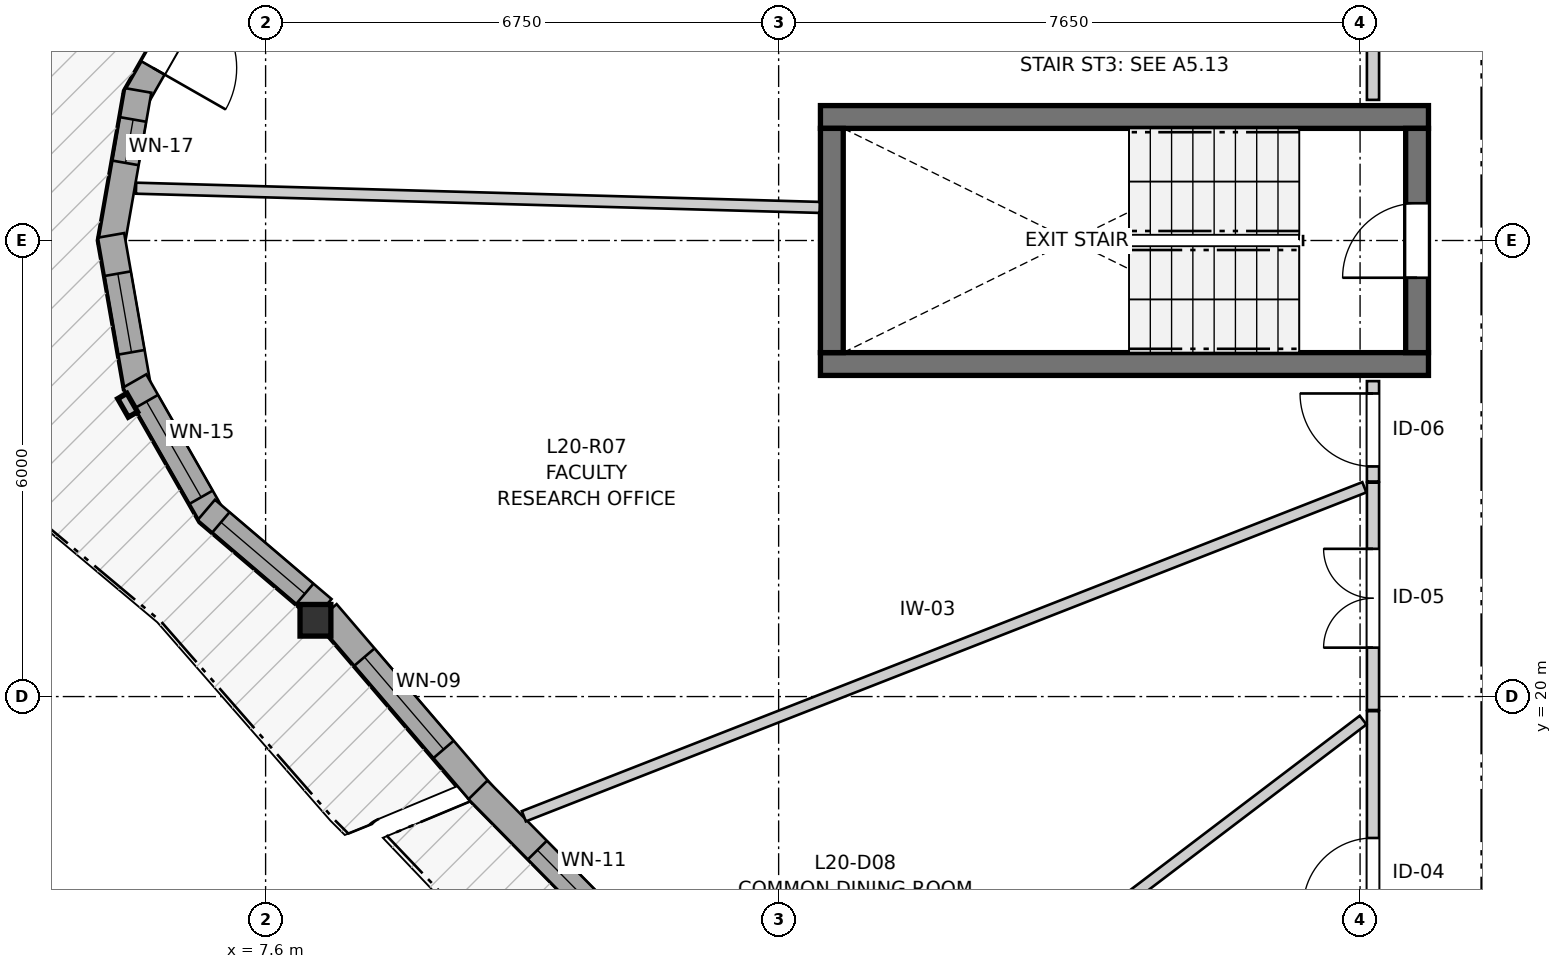
"""IFC4 building model, lengths in metres.
Left out: names, types, materials, properties, quantities, classifications, styles, units other than length and angle.
Written with IfcOpenShell. Run it as: python <this file> out.ifc"""

import sys

from ifc_helpers import new_model, si_unit, direction, frame, frame_2d, origin, origin_2d, place, context, subcontext, project, spatial, rectangle, i_section, extrude, source, transform, mapped, element, fill, save


model = new_model("IFC4")
c1 = context("Model", 3, precision=1e-05, world=origin(), true_north=direction((0.0, 1.0)))
c2 = subcontext(c1, "Body", "Model", "MODEL_VIEW")
j1 = project(units=[si_unit("LENGTHUNIT", "METRE"), si_unit("PLANEANGLEUNIT", "RADIAN")], contexts=[c1])
p1 = place(None, origin())
s1 = spatial("IfcSite", under=j1, at=p1, CompositionType="ELEMENT")
p2 = place(p1, origin())
s2 = spatial("IfcBuilding", under=s1, at=p2, CompositionType="ELEMENT")
p3 = place(p2, frame((0.0, 0.0, 70.4)))
s3 = spatial("IfcBuildingStorey", under=s2, at=p3, CompositionType="ELEMENT", Elevation=70.4)
for number, where, z_axis, x_axis in (
    (1, (14.9, 24.375, 0.0), (0.0, 0.0, 1.0), (1.0, 0.0, 0.0)),
    (2, (22.9, 27.625, 0.0), (0.0, 0.0, 1.0), (-1.0, 0.0, 0.0)),
):
    element("IfcWall", number, at=place(p3, frame(where, z_axis=z_axis, x_axis=x_axis)), inside=s3, PredefinedType="SHEAR", context=c2, shape_type="SweptSolid", body=[
        extrude(rectangle(XDim=8.0, YDim=0.3, at=frame_2d((4.0, 0.0))), origin(), (0.0, 0.0, 1.0), 2.95),
    ])
p4 = place(p3, frame((15.05, 27.475, 0.0), z_axis=(0.0, 0.0, 1.0), x_axis=(0.0, -1.0, 0.0)))
e3 = element("IfcWall", 3, at=p4, inside=s3, PredefinedType="SHEAR", context=c2, shape_type="SweptSolid", body=[
    extrude(rectangle(XDim=2.95, YDim=0.3, at=frame_2d((1.475, 0.0))), origin(), (0.0, 0.0, 1.0), 2.95),
])
p5 = place(p3, frame((22.75, 24.525, 0.0), z_axis=(0.0, 0.0, 1.0), x_axis=(0.0, 1.0, 0.0)))
e4 = element("IfcWall", 4, at=p5, inside=s3, PredefinedType="SHEAR", context=c2, shape_type="SweptSolid", body=[
    extrude(rectangle(XDim=2.95, YDim=0.3, at=frame_2d((1.475, 0.0))), origin(), (0.0, 0.0, 1.0), 2.95),
])
p6 = place(p5, frame((0.985, 0.0, 0.0)))
e5 = element("IfcOpeningElement", 5, at=p6, cuts=e4, PredefinedType="OPENING", context=c2, shape_type="SweptSolid", body=[
    extrude(rectangle(XDim=0.98, YDim=2.15, at=frame_2d((0.49, 1.075))), frame((0.0, 0.16, 0.0), z_axis=(0.0, -1.0, 0.0), x_axis=(1.0, 0.0, 0.0)), (0.0, 0.0, 1.0), 0.32),
])
m1 = source(origin(), c2, "Body", "SweptSolid", [
    extrude(i_section(OverallWidth=0.406, OverallDepth=0.416, WebThickness=0.027, FlangeThickness=0.044, FilletRadius=0.015, at=origin_2d()), origin(), (0.0, 0.0, 1.0), 2.95),
])
p7 = place(p3, frame((8.256, 21.003, 0.0), z_axis=(0.0, 0.0, 1.0), x_axis=(1.0, 0.0, 0.0)))
e6 = element("IfcColumn", 6, at=p7, inside=s3, PredefinedType="PILASTER", context=c2, shape_type="MappedRepresentation", body=[
    mapped(m1, transform((0.0, 0.0, 0.0), x_axis=(1.0, 0.0, 0.0), y_axis=(0.0, 1.0, 0.0), z_axis=(0.0, 0.0, 1.0), scale=1.0)),
])
p8 = place(p3, frame((6.906, 29.647, 0.0), z_axis=(0.0, 0.0, 1.0), x_axis=(-0.496037473582, -0.868301114132, 0.0)))
e7 = element("IfcWall", 7, at=p8, inside=s3, PredefinedType="SOLIDWALL", context=c2, shape_type="SweptSolid", body=[
    extrude(rectangle(XDim=2.073, YDim=0.35, at=frame_2d((1.037, 0.0))), origin(), (0.0, 0.0, 1.0), 2.48),
])
p9 = place(p8, frame((0.487, 0.0, 0.0)))
e8 = element("IfcOpeningElement", 8, at=p9, cuts=e7, PredefinedType="OPENING", context=c2, shape_type="SweptSolid", body=[
    extrude(rectangle(XDim=1.1, YDim=2.1, at=frame_2d((0.55, 1.05))), frame((0.0, 0.185, 0.0), z_axis=(0.0, -1.0, 0.0), x_axis=(1.0, 0.0, 0.0)), (0.0, 0.0, 1.0), 0.37),
])
p10 = place(p3, frame((5.924, 27.975, 0.0), z_axis=(0.0, 0.0, 1.0), x_axis=(-0.172166087538, -0.985067935881, 0.0)))
e9 = element("IfcWall", 9, at=p10, inside=s3, PredefinedType="SOLIDWALL", context=c2, shape_type="SweptSolid", body=[
    extrude(rectangle(XDim=2.073, YDim=0.35, at=frame_2d((1.037, 0.0))), origin(), (0.0, 0.0, 1.0), 2.48),
])
p11 = place(p10, frame((0.388, 0.0, 0.82)))
e10 = element("IfcOpeningElement", 10, at=p11, cuts=e9, PredefinedType="OPENING", context=c2, shape_type="SweptSolid", body=[
    extrude(rectangle(XDim=0.58, YDim=1.35, at=frame_2d((0.29, 0.675))), frame((0.0, 0.185, 0.0), z_axis=(0.0, -1.0, 0.0), x_axis=(1.0, 0.0, 0.0)), (0.0, 0.0, 1.0), 0.37),
])
p12 = place(p3, frame((5.567, 26.068, 0.0), z_axis=(0.0, 0.0, 1.0), x_axis=(0.172166087538, -0.985067935881, 0.0)))
e11 = element("IfcWall", 11, at=p12, inside=s3, PredefinedType="SOLIDWALL", context=c2, shape_type="SweptSolid", body=[
    extrude(rectangle(XDim=2.073, YDim=0.35, at=frame_2d((1.037, 0.0))), origin(), (0.0, 0.0, 1.0), 2.48),
])
p13 = place(p12, frame((0.511, 0.0, 0.82)))
e12 = element("IfcOpeningElement", 12, at=p13, cuts=e11, PredefinedType="OPENING", context=c2, shape_type="SweptSolid", body=[
    extrude(rectangle(XDim=1.05, YDim=1.45, at=frame_2d((0.525, 0.725))), frame((0.0, 0.185, 0.0), z_axis=(0.0, -1.0, 0.0), x_axis=(1.0, 0.0, 0.0)), (0.0, 0.0, 1.0), 0.37),
])
p14 = place(p3, frame((5.878, 24.153, 0.0), z_axis=(0.0, 0.0, 1.0), x_axis=(0.496037473582, -0.868301114132, 0.0)))
e13 = element("IfcWall", 13, at=p14, inside=s3, PredefinedType="SOLIDWALL", context=c2, shape_type="SweptSolid", body=[
    extrude(rectangle(XDim=2.073, YDim=0.35, at=frame_2d((1.037, 0.0))), origin(), (0.0, 0.0, 1.0), 2.48),
])
p15 = place(p14, frame((0.312, 0.0, 0.82)))
e14 = element("IfcOpeningElement", 14, at=p15, cuts=e13, PredefinedType="OPENING", context=c2, shape_type="SweptSolid", body=[
    extrude(rectangle(XDim=1.45, YDim=1.25, at=frame_2d((0.725, 0.625))), frame((0.0, 0.185, 0.0), z_axis=(0.0, -1.0, 0.0), x_axis=(1.0, 0.0, 0.0)), (0.0, 0.0, 1.0), 0.37),
])
p16 = place(p3, frame((6.82, 22.457, 0.0), z_axis=(0.0, 0.0, 1.0), x_axis=(0.76114353683, -0.648583469063, 0.0)))
e15 = element("IfcWall", 15, at=p16, inside=s3, PredefinedType="SOLIDWALL", context=c2, shape_type="SweptSolid", body=[
    extrude(rectangle(XDim=2.015, YDim=0.35, at=frame_2d((1.007, 0.0))), origin(), (0.0, 0.0, 1.0), 2.48),
])
p17 = place(p16, frame((0.252, 0.0, 0.82)))
e16 = element("IfcOpeningElement", 16, at=p17, cuts=e15, PredefinedType="OPENING", context=c2, shape_type="SweptSolid", body=[
    extrude(rectangle(XDim=1.45, YDim=1.25, at=frame_2d((0.725, 0.625))), frame((0.0, 0.185, 0.0), z_axis=(0.0, -1.0, 0.0), x_axis=(1.0, 0.0, 0.0)), (0.0, 0.0, 1.0), 0.37),
])
p18 = place(p3, frame((8.402, 21.102, 0.0), z_axis=(0.0, 0.0, 1.0), x_axis=(0.650797748491, -0.759251138004, 0.0)))
e17 = element("IfcWall", 17, at=p18, inside=s3, PredefinedType="SOLIDWALL", context=c2, shape_type="SweptSolid", body=[
    extrude(rectangle(XDim=3.154, YDim=0.35, at=frame_2d((1.577, 0.0))), origin(), (0.0, 0.0, 1.0), 2.48),
])
p19 = place(p18, frame((0.767, 0.0, 0.82)))
e18 = element("IfcOpeningElement", 18, at=p19, cuts=e17, PredefinedType="OPENING", context=c2, shape_type="SweptSolid", body=[
    extrude(rectangle(XDim=1.6, YDim=1.35, at=frame_2d((0.8, 0.675))), frame((0.0, 0.185, 0.0), z_axis=(0.0, -1.0, 0.0), x_axis=(1.0, 0.0, 0.0)), (0.0, 0.0, 1.0), 0.37),
])
p20 = place(p3, frame((10.394, 18.773, 0.0), z_axis=(0.0, 0.0, 1.0), x_axis=(0.701965316192, -0.712211130819, 0.0)))
e19 = element("IfcWall", 19, at=p20, inside=s3, PredefinedType="SOLIDWALL", context=c2, shape_type="SweptSolid", body=[
    extrude(rectangle(XDim=2.883, YDim=0.35, at=frame_2d((1.442, 0.0))), origin(), (0.0, 0.0, 1.0), 2.48),
])
p21 = place(p20, frame((1.113, 0.0, 0.82)))
e20 = element("IfcOpeningElement", 20, at=p21, cuts=e19, PredefinedType="OPENING", context=c2, shape_type="SweptSolid", body=[
    extrude(rectangle(XDim=1.25, YDim=1.35, at=frame_2d((0.625, 0.675))), frame((0.0, 0.185, 0.0), z_axis=(0.0, -1.0, 0.0), x_axis=(1.0, 0.0, 0.0)), (0.0, 0.0, 1.0), 0.37),
])
p22 = place(p3, frame((22.17, 15.57, 0.0), z_axis=(0.0, 0.0, 1.0), x_axis=(0.0, 1.0, 0.0)))
e21 = element("IfcWall", 21, at=p22, inside=s3, PredefinedType="PARTITIONING", context=c2, shape_type="SweptSolid", body=[
    extrude(rectangle(XDim=4.238, YDim=0.16, at=frame_2d((2.119, 0.0))), origin(), (0.0, 0.0, 1.0), 2.95),
])
p23 = place(p22, frame((1.649, 0.0, 0.0)))
e22 = element("IfcOpeningElement", 22, at=p23, cuts=e21, PredefinedType="OPENING", context=c2, shape_type="SweptSolid", body=[
    extrude(rectangle(XDim=0.92, YDim=2.1, at=frame_2d((0.46, 1.05))), frame((0.0, 0.09, 0.0), z_axis=(0.0, -1.0, 0.0), x_axis=(1.0, 0.0, 0.0)), (0.0, 0.0, 1.0), 0.18),
])
p24 = place(p3, frame((22.17, 27.85, 0.0), z_axis=(0.0, 0.0, 1.0), x_axis=(0.0, 1.0, 0.0)))
e23 = element("IfcWall", 23, at=p24, inside=s3, PredefinedType="PARTITIONING", context=c2, shape_type="SweptSolid", body=[
    extrude(rectangle(XDim=3.745, YDim=0.16, at=frame_2d((1.873, 0.0))), origin(), (0.0, 0.0, 1.0), 2.95),
])
p25 = place(p24, frame((1.438, 0.0, 0.0)))
e24 = element("IfcOpeningElement", 24, at=p25, cuts=e23, PredefinedType="OPENING", context=c2, shape_type="SweptSolid", body=[
    extrude(rectangle(XDim=0.96, YDim=2.1, at=frame_2d((0.48, 1.05))), frame((0.0, 0.09, 0.0), z_axis=(0.0, -1.0, 0.0), x_axis=(1.0, 0.0, 0.0)), (0.0, 0.0, 1.0), 0.18),
])
p26 = place(p3, frame((22.17, 19.823, 0.0), z_axis=(0.0, 0.0, 1.0), x_axis=(0.0, 1.0, 0.0)))
e25 = element("IfcWall", 25, at=p26, inside=s3, PredefinedType="PARTITIONING", context=c2, shape_type="SweptSolid", body=[
    extrude(rectangle(XDim=2.991, YDim=0.16, at=frame_2d((1.496, 0.0))), origin(), (0.0, 0.0, 1.0), 2.95),
])
p27 = place(p26, frame((0.821, 0.0, 0.0)))
e26 = element("IfcOpeningElement", 26, at=p27, cuts=e25, PredefinedType="OPENING", context=c2, shape_type="SweptSolid", body=[
    extrude(rectangle(XDim=1.3, YDim=2.1, at=frame_2d((0.65, 1.05))), frame((0.0, 0.09, 0.0), z_axis=(0.0, -1.0, 0.0), x_axis=(1.0, 0.0, 0.0)), (0.0, 0.0, 1.0), 0.18),
])
p28 = place(p3, frame((22.17, 22.829, 0.0), z_axis=(0.0, 0.0, 1.0), x_axis=(0.0, 1.0, 0.0)))
e27 = element("IfcWall", 27, at=p28, inside=s3, PredefinedType="PARTITIONING", context=c2, shape_type="SweptSolid", body=[
    extrude(rectangle(XDim=1.321, YDim=0.16, at=frame_2d((0.66, 0.0))), origin(), (0.0, 0.0, 1.0), 2.95),
])
p29 = place(p28, frame((0.198, 0.0, 0.0)))
e28 = element("IfcOpeningElement", 28, at=p29, cuts=e27, PredefinedType="OPENING", context=c2, shape_type="SweptSolid", body=[
    extrude(rectangle(XDim=0.96, YDim=2.1, at=frame_2d((0.48, 1.05))), frame((0.0, 0.09, 0.0), z_axis=(0.0, -1.0, 0.0), x_axis=(1.0, 0.0, 0.0)), (0.0, 0.0, 1.0), 0.18),
])
p30 = place(p3, frame((10.998, 18.425, 0.0), z_axis=(0.0, 0.0, 1.0), x_axis=(0.931213049878, 0.364475315676, 0.0)))
e29 = element("IfcWall", 29, at=p30, inside=s3, PredefinedType="PARTITIONING", context=c2, shape_type="SweptSolid", body=[
    extrude(rectangle(XDim=11.875, YDim=0.145, at=frame_2d((5.938, 0.0))), origin(), (0.0, 0.0, 1.0), 2.95),
])
p31 = place(p3, frame((5.896, 26.688, 0.0), z_axis=(0.0, 0.0, 1.0), x_axis=(0.999604843423, -0.028109731489, 0.0)))
e30 = element("IfcWall", 30, at=p31, inside=s3, PredefinedType="PARTITIONING", context=c2, shape_type="SweptSolid", body=[
    extrude(rectangle(XDim=8.998, YDim=0.145, at=frame_2d((4.499, 0.0))), origin(), (0.0, 0.0, 1.0), 2.95),
])
p32 = place(p3, frame((15.239, 14.526, 0.0), z_axis=(0.0, 0.0, 1.0), x_axis=(0.796393529077, 0.604778758592, 0.0)))
e31 = element("IfcWall", 31, at=p32, inside=s3, PredefinedType="PARTITIONING", context=c2, shape_type="SweptSolid", body=[
    extrude(rectangle(XDim=8.539, YDim=0.145, at=frame_2d((4.27, 0.0))), origin(), (0.0, 0.0, 1.0), 2.95),
])
m2 = source(origin(), c2, "Body", "SweptSolid", [
    extrude(rectangle(XDim=1.1, YDim=2.1, at=frame_2d((0.55, 1.05))), frame((0.0, 0.025, 0.0), z_axis=(0.0, -1.0, 0.0), x_axis=(1.0, 0.0, 0.0)), (0.0, 0.0, 1.0), 0.05),
])
p33 = place(p9, origin())
e32 = element("IfcDoor", 32, at=p33, inside=s3, OperationType="SINGLE_SWING_RIGHT", PredefinedType="DOOR", context=c2, shape_type="MappedRepresentation", body=[
    mapped(m2, transform((0.0, 0.0, 0.0), x_axis=(1.0, 0.0, 0.0), y_axis=(0.0, 1.0, 0.0), z_axis=(0.0, 0.0, 1.0), scale=1.0)),
])
fill(e8, e32)
m3 = source(origin(), c2, "Body", "SweptSolid", [
    extrude(rectangle(XDim=0.58, YDim=1.35, at=frame_2d((0.29, 0.675))), frame((0.0, 0.03, 0.0), z_axis=(0.0, -1.0, 0.0), x_axis=(1.0, 0.0, 0.0)), (0.0, 0.0, 1.0), 0.06),
])
p34 = place(p11, origin())
e33 = element("IfcWindow", 33, at=p34, inside=s3, PartitioningType="SINGLE_PANEL", PredefinedType="WINDOW", context=c2, shape_type="MappedRepresentation", body=[
    mapped(m3, transform((0.0, 0.0, 0.0), x_axis=(1.0, 0.0, 0.0), y_axis=(0.0, 1.0, 0.0), z_axis=(0.0, 0.0, 1.0), scale=1.0)),
])
fill(e10, e33)
m4 = source(origin(), c2, "Body", "SweptSolid", [
    extrude(rectangle(XDim=1.05, YDim=1.45, at=frame_2d((0.525, 0.725))), frame((0.0, 0.03, 0.0), z_axis=(0.0, -1.0, 0.0), x_axis=(1.0, 0.0, 0.0)), (0.0, 0.0, 1.0), 0.06),
])
p35 = place(p13, origin())
e34 = element("IfcWindow", 34, at=p35, inside=s3, PartitioningType="SINGLE_PANEL", PredefinedType="WINDOW", context=c2, shape_type="MappedRepresentation", body=[
    mapped(m4, transform((0.0, 0.0, 0.0), x_axis=(1.0, 0.0, 0.0), y_axis=(0.0, 1.0, 0.0), z_axis=(0.0, 0.0, 1.0), scale=1.0)),
])
fill(e12, e34)
m5 = source(origin(), c2, "Body", "SweptSolid", [
    extrude(rectangle(XDim=1.45, YDim=1.25, at=frame_2d((0.725, 0.625))), frame((0.0, 0.03, 0.0), z_axis=(0.0, -1.0, 0.0), x_axis=(1.0, 0.0, 0.0)), (0.0, 0.0, 1.0), 0.06),
])
p36 = place(p15, origin())
e35 = element("IfcWindow", 35, at=p36, inside=s3, PartitioningType="SINGLE_PANEL", PredefinedType="WINDOW", context=c2, shape_type="MappedRepresentation", body=[
    mapped(m5, transform((0.0, 0.0, 0.0), x_axis=(1.0, 0.0, 0.0), y_axis=(0.0, 1.0, 0.0), z_axis=(0.0, 0.0, 1.0), scale=1.0)),
])
fill(e14, e35)
p37 = place(p17, origin())
e36 = element("IfcWindow", 36, at=p37, inside=s3, PartitioningType="SINGLE_PANEL", PredefinedType="WINDOW", context=c2, shape_type="MappedRepresentation", body=[
    mapped(m5, transform((0.0, 0.0, 0.0), x_axis=(1.0, 0.0, 0.0), y_axis=(0.0, 1.0, 0.0), z_axis=(0.0, 0.0, 1.0), scale=1.0)),
])
fill(e16, e36)
m6 = source(origin(), c2, "Body", "SweptSolid", [
    extrude(rectangle(XDim=1.6, YDim=1.35, at=frame_2d((0.8, 0.675))), frame((0.0, 0.03, 0.0), z_axis=(0.0, -1.0, 0.0), x_axis=(1.0, 0.0, 0.0)), (0.0, 0.0, 1.0), 0.06),
])
p38 = place(p19, origin())
e37 = element("IfcWindow", 37, at=p38, inside=s3, PartitioningType="SINGLE_PANEL", PredefinedType="WINDOW", context=c2, shape_type="MappedRepresentation", body=[
    mapped(m6, transform((0.0, 0.0, 0.0), x_axis=(1.0, 0.0, 0.0), y_axis=(0.0, 1.0, 0.0), z_axis=(0.0, 0.0, 1.0), scale=1.0)),
])
fill(e18, e37)
m7 = source(origin(), c2, "Body", "SweptSolid", [
    extrude(rectangle(XDim=1.25, YDim=1.35, at=frame_2d((0.625, 0.675))), frame((0.0, 0.03, 0.0), z_axis=(0.0, -1.0, 0.0), x_axis=(1.0, 0.0, 0.0)), (0.0, 0.0, 1.0), 0.06),
])
p39 = place(p21, origin())
e38 = element("IfcWindow", 38, at=p39, inside=s3, PartitioningType="SINGLE_PANEL", PredefinedType="WINDOW", context=c2, shape_type="MappedRepresentation", body=[
    mapped(m7, transform((0.0, 0.0, 0.0), x_axis=(1.0, 0.0, 0.0), y_axis=(0.0, 1.0, 0.0), z_axis=(0.0, 0.0, 1.0), scale=1.0)),
])
fill(e20, e38)
m8 = source(origin(), c2, "Body", "SweptSolid", [
    extrude(rectangle(XDim=0.98, YDim=2.15, at=frame_2d((0.49, 1.075))), frame((0.0, 0.025, 0.0), z_axis=(0.0, -1.0, 0.0), x_axis=(1.0, 0.0, 0.0)), (0.0, 0.0, 1.0), 0.05),
])
p40 = place(p6, origin())
e39 = element("IfcDoor", 39, at=p40, inside=s3, OperationType="SINGLE_SWING_LEFT", PredefinedType="DOOR", context=c2, shape_type="MappedRepresentation", body=[
    mapped(m8, transform((0.0, 0.0, 0.0), x_axis=(1.0, 0.0, 0.0), y_axis=(0.0, 1.0, 0.0), z_axis=(0.0, 0.0, 1.0), scale=1.0)),
])
fill(e5, e39)
m9 = source(origin(), c2, "Body", "SweptSolid", [
    extrude(rectangle(XDim=0.92, YDim=2.1, at=frame_2d((0.46, 1.05))), frame((0.0, 0.025, 0.0), z_axis=(0.0, -1.0, 0.0), x_axis=(1.0, 0.0, 0.0)), (0.0, 0.0, 1.0), 0.05),
])
p41 = place(p23, origin())
e40 = element("IfcDoor", 40, at=p41, inside=s3, OperationType="SINGLE_SWING_LEFT", PredefinedType="DOOR", context=c2, shape_type="MappedRepresentation", body=[
    mapped(m9, transform((0.0, 0.0, 0.0), x_axis=(1.0, 0.0, 0.0), y_axis=(0.0, 1.0, 0.0), z_axis=(0.0, 0.0, 1.0), scale=1.0)),
])
fill(e22, e40)
m10 = source(origin(), c2, "Body", "SweptSolid", [
    extrude(rectangle(XDim=1.3, YDim=2.1, at=frame_2d((0.65, 1.05))), frame((0.0, 0.025, 0.0), z_axis=(0.0, -1.0, 0.0), x_axis=(1.0, 0.0, 0.0)), (0.0, 0.0, 1.0), 0.05),
])
p42 = place(p27, origin())
e41 = element("IfcDoor", 41, at=p42, inside=s3, OperationType="DOUBLE_DOOR_SINGLE_SWING", PredefinedType="DOOR", context=c2, shape_type="MappedRepresentation", body=[
    mapped(m10, transform((0.0, 0.0, 0.0), x_axis=(1.0, 0.0, 0.0), y_axis=(0.0, 1.0, 0.0), z_axis=(0.0, 0.0, 1.0), scale=1.0)),
])
fill(e26, e41)
m11 = source(origin(), c2, "Body", "SweptSolid", [
    extrude(rectangle(XDim=0.96, YDim=2.1, at=frame_2d((0.48, 1.05))), frame((0.0, 0.025, 0.0), z_axis=(0.0, -1.0, 0.0), x_axis=(1.0, 0.0, 0.0)), (0.0, 0.0, 1.0), 0.05),
])
p43 = place(p29, origin())
e42 = element("IfcDoor", 42, at=p43, inside=s3, OperationType="SINGLE_SWING_RIGHT", PredefinedType="DOOR", context=c2, shape_type="MappedRepresentation", body=[
    mapped(m11, transform((0.0, 0.0, 0.0), x_axis=(1.0, 0.0, 0.0), y_axis=(0.0, 1.0, 0.0), z_axis=(0.0, 0.0, 1.0), scale=1.0)),
])
fill(e28, e42)
save(model, sys.argv[1])
